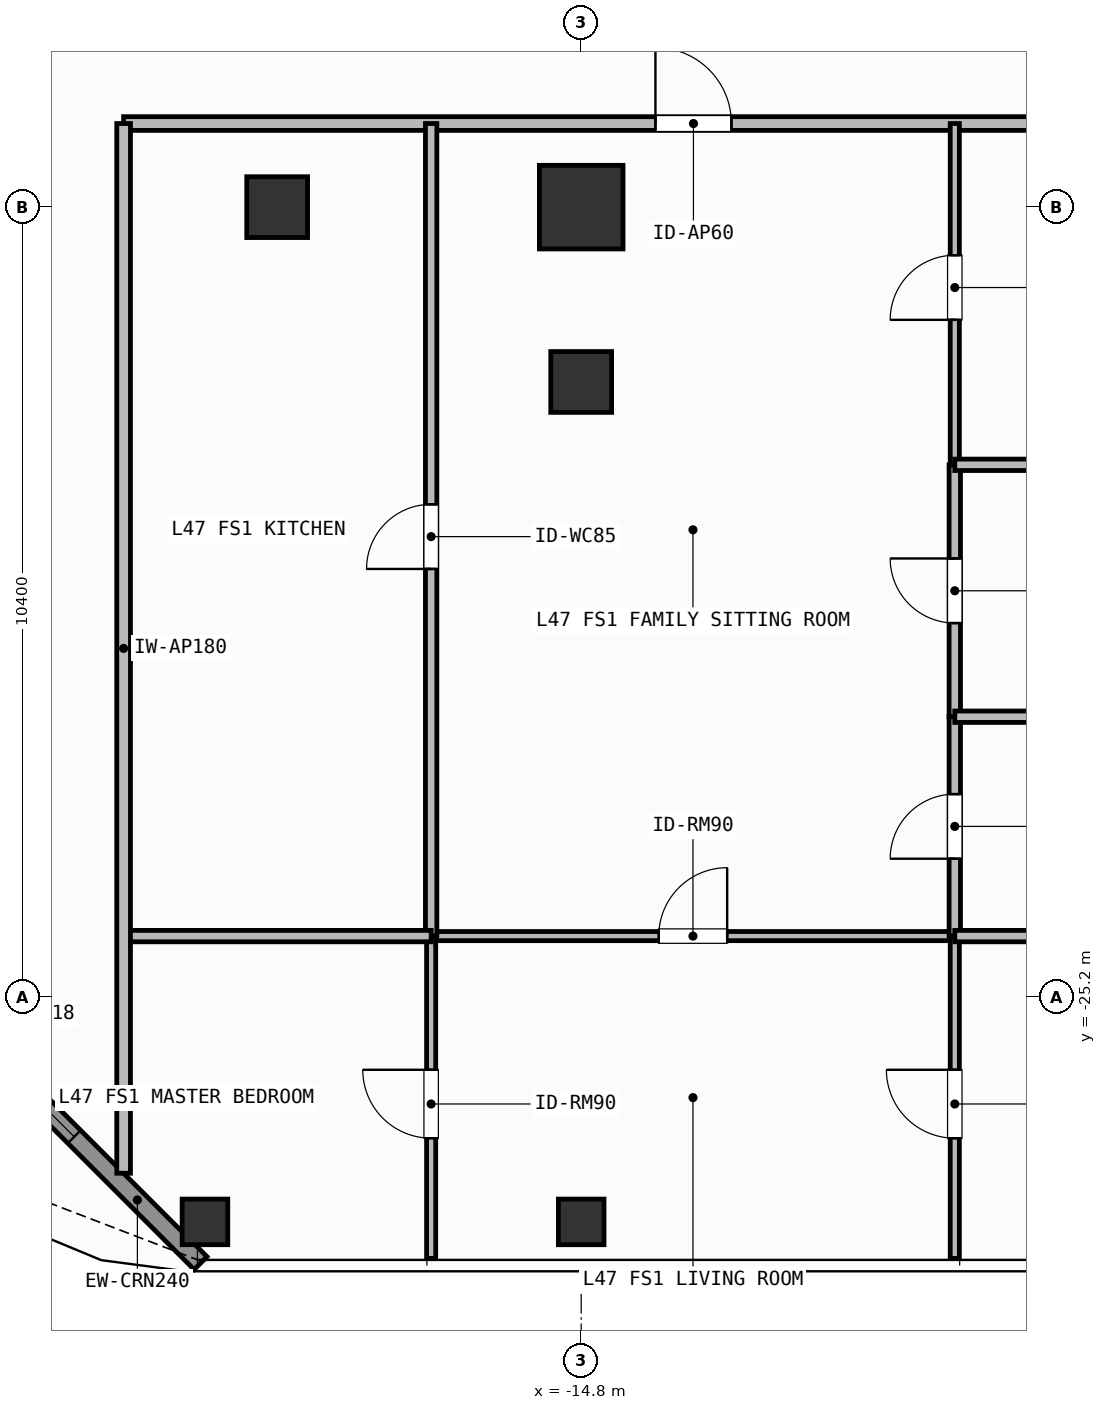
"""IFC4 building model, lengths in metres.
Left out: names, types, materials, properties, quantities, classifications, styles, units other than length and angle.
Written with IfcOpenShell. Run it as: python <this file> out.ifc"""

import sys

from ifc_helpers import new_model, si_unit, direction, frame, frame_2d, origin, origin_2d, place, context, subcontext, project, spatial, rectangle, hollow_rectangle, extrude, element, fill, save


model = new_model("IFC4")
c1 = context("Model", 3, precision=1e-05, world=origin(), true_north=direction((0.0, 1.0)))
c2 = subcontext(c1, "Body", "Model", "MODEL_VIEW")
j1 = project(units=[si_unit("LENGTHUNIT", "METRE"), si_unit("PLANEANGLEUNIT", "RADIAN")], contexts=[c1])
p1 = place(None, origin())
s1 = spatial("IfcSite", under=j1, at=p1, CompositionType="ELEMENT")
p2 = place(p1, origin())
s2 = spatial("IfcBuilding", under=s1, at=p2, CompositionType="ELEMENT")
p3 = place(p2, frame((0.0, 0.0, 191.4)))
s3 = spatial("IfcBuildingStorey", under=s2, at=p3, CompositionType="ELEMENT", Elevation=191.4)
p4 = place(p3, frame((-14.8, -14.8, 0.0), z_axis=(0.0, 0.0, 1.0), x_axis=(1.0, 0.0, 0.0)))
e1 = element("IfcColumn", 1, at=p4, inside=s3, PredefinedType="COLUMN", context=c2, shape_type="SweptSolid", body=[
    extrude(rectangle(XDim=1.1, YDim=1.1, at=origin_2d()), origin(), (0.0, 0.0, 1.0), 3.9),
])
for number, where, z_axis, x_axis in (
    (2, (-18.8, -14.8, 0.0), (0.0, 0.0, 1.0), (1.0, 0.0, 0.0)),
    (3, (-14.8, -17.1, 0.0), (0.0, 0.0, 1.0), (1.0, 0.0, 0.0)),
):
    element("IfcColumn", number, at=place(p3, frame(where, z_axis=z_axis, x_axis=x_axis)), inside=s3, PredefinedType="COLUMN", context=c2, shape_type="SweptSolid", body=[
        extrude(hollow_rectangle(XDim=0.8, YDim=0.8, WallThickness=0.036, at=origin_2d()), origin(), (0.0, 0.0, 1.0), 3.9),
    ])
for number, where, z_axis, x_axis in (
    (4, (-19.75, -28.15, 0.0), (0.0, 0.0, 1.0), (1.0, 0.0, 0.0)),
    (5, (-14.8, -28.15, 0.0), (0.0, 0.0, 1.0), (1.0, 0.0, 0.0)),
):
    element("IfcColumn", number, at=place(p3, frame(where, z_axis=z_axis, x_axis=x_axis)), inside=s3, PredefinedType="COLUMN", context=c2, shape_type="SweptSolid", body=[
        extrude(hollow_rectangle(XDim=0.6, YDim=0.6, WallThickness=0.028, at=origin_2d()), origin(), (0.0, 0.0, 1.0), 3.9),
    ])
p5 = place(p3, frame((-19.808, -28.692, 0.0), z_axis=(0.0, 0.0, 1.0), x_axis=(-0.707106781187, 0.707106781187, 0.0)))
e6 = element("IfcWall", 6, at=p5, inside=s3, PredefinedType="SOLIDWALL", context=c2, shape_type="SweptSolid", body=[
    extrude(rectangle(XDim=6.201, YDim=0.24, at=frame_2d((3.101, 0.0))), origin(), (0.0, 0.0, 1.0), 3.68),
])
p6 = place(p5, frame((2.351, 0.0, 0.8)))
e7 = element("IfcOpeningElement", 7, at=p6, cuts=e6, PredefinedType="OPENING", context=c2, shape_type="SweptSolid", body=[
    extrude(rectangle(XDim=1.5, YDim=1.85, at=frame_2d((0.75, 0.925))), frame((0.0, 0.13, 0.0), z_axis=(0.0, -1.0, 0.0), x_axis=(1.0, 0.0, 0.0)), (0.0, 0.0, 1.0), 0.26),
])
p7 = place(p3, frame((-20.82, -13.7, 0.0), z_axis=(0.0, 0.0, 1.0), x_axis=(1.0, 0.0, 0.0)))
e8 = element("IfcWall", 8, at=p7, inside=s3, PredefinedType="PARTITIONING", context=c2, shape_type="SweptSolid", body=[
    extrude(rectangle(XDim=15.893, YDim=0.18, at=frame_2d((7.947, 0.0))), origin(), (0.0, 0.0, 1.0), 3.68),
])
p8 = place(p7, frame((6.997, 0.0, 0.0)))
e9 = element("IfcOpeningElement", 9, at=p8, cuts=e8, PredefinedType="OPENING", context=c2, shape_type="SweptSolid", body=[
    extrude(rectangle(XDim=1.0, YDim=2.2, at=frame_2d((0.5, 1.1))), frame((0.0, 0.1, 0.0), z_axis=(0.0, -1.0, 0.0), x_axis=(1.0, 0.0, 0.0)), (0.0, 0.0, 1.0), 0.2),
])
p9 = place(p3, frame((-16.774, -24.39, 0.0), z_axis=(0.0, 0.0, 1.0), x_axis=(1.0, 0.0, 0.0)))
e10 = element("IfcWall", 10, at=p9, inside=s3, PredefinedType="PARTITIONING", context=c2, shape_type="SweptSolid", body=[
    extrude(rectangle(XDim=6.889, YDim=0.12, at=frame_2d((3.444, 0.0))), origin(), (0.0, 0.0, 1.0), 3.68),
])
p10 = place(p9, frame((2.994, 0.0, 0.0)))
e11 = element("IfcOpeningElement", 11, at=p10, cuts=e10, PredefinedType="OPENING", context=c2, shape_type="SweptSolid", body=[
    extrude(rectangle(XDim=0.9, YDim=2.1, at=frame_2d((0.45, 1.05))), frame((0.0, 0.07, 0.0), z_axis=(0.0, -1.0, 0.0), x_axis=(1.0, 0.0, 0.0)), (0.0, 0.0, 1.0), 0.14),
])
p11 = place(p3, frame((-16.774, -24.39, 0.0), z_axis=(0.0, 0.0, 1.0), x_axis=(0.0, 1.0, 0.0)))
e12 = element("IfcWall", 12, at=p11, inside=s3, PredefinedType="PARTITIONING", context=c2, shape_type="SweptSolid", body=[
    extrude(rectangle(XDim=10.69, YDim=0.15, at=frame_2d((5.345, 0.0))), origin(), (0.0, 0.0, 1.0), 3.68),
])
p12 = place(p11, frame((4.83, 0.0, 0.0)))
e13 = element("IfcOpeningElement", 13, at=p12, cuts=e12, PredefinedType="OPENING", context=c2, shape_type="SweptSolid", body=[
    extrude(rectangle(XDim=0.85, YDim=2.1, at=frame_2d((0.425, 1.05))), frame((0.0, 0.085, 0.0), z_axis=(0.0, -1.0, 0.0), x_axis=(1.0, 0.0, 0.0)), (0.0, 0.0, 1.0), 0.17),
])
p13 = place(p3, frame((-16.774, -28.63, 0.0), z_axis=(0.0, 0.0, 1.0), x_axis=(0.0, 1.0, 0.0)))
e14 = element("IfcWall", 14, at=p13, inside=s3, PredefinedType="PARTITIONING", context=c2, shape_type="SweptSolid", body=[
    extrude(rectangle(XDim=4.24, YDim=0.12, at=frame_2d((2.12, 0.0))), origin(), (0.0, 0.0, 1.0), 3.68),
])
p14 = place(p13, frame((1.581, 0.0, 0.0)))
e15 = element("IfcOpeningElement", 15, at=p14, cuts=e14, PredefinedType="OPENING", context=c2, shape_type="SweptSolid", body=[
    extrude(rectangle(XDim=0.9, YDim=2.1, at=frame_2d((0.45, 1.05))), frame((0.0, 0.07, 0.0), z_axis=(0.0, -1.0, 0.0), x_axis=(1.0, 0.0, 0.0)), (0.0, 0.0, 1.0), 0.14),
])
p15 = place(p3, frame((-9.885, -24.39, 0.0), z_axis=(0.0, 0.0, 1.0), x_axis=(0.0, 1.0, 0.0)))
e16 = element("IfcWall", 16, at=p15, inside=s3, PredefinedType="PARTITIONING", context=c2, shape_type="SweptSolid", body=[
    extrude(rectangle(XDim=2.886, YDim=0.15, at=frame_2d((1.443, 0.0))), origin(), (0.0, 0.0, 1.0), 3.68),
])
p16 = place(p15, frame((1.018, 0.0, 0.0)))
e17 = element("IfcOpeningElement", 17, at=p16, cuts=e16, PredefinedType="OPENING", context=c2, shape_type="SweptSolid", body=[
    extrude(rectangle(XDim=0.85, YDim=2.1, at=frame_2d((0.425, 1.05))), frame((0.0, 0.085, 0.0), z_axis=(0.0, -1.0, 0.0), x_axis=(1.0, 0.0, 0.0)), (0.0, 0.0, 1.0), 0.17),
])
p17 = place(p3, frame((-9.885, -21.504, 0.0), z_axis=(0.0, 0.0, 1.0), x_axis=(0.0, 1.0, 0.0)))
e18 = element("IfcWall", 18, at=p17, inside=s3, PredefinedType="PARTITIONING", context=c2, shape_type="SweptSolid", body=[
    extrude(rectangle(XDim=3.314, YDim=0.15, at=frame_2d((1.657, 0.0))), origin(), (0.0, 0.0, 1.0), 3.68),
])
p18 = place(p17, frame((1.232, 0.0, 0.0)))
e19 = element("IfcOpeningElement", 19, at=p18, cuts=e18, PredefinedType="OPENING", context=c2, shape_type="SweptSolid", body=[
    extrude(rectangle(XDim=0.85, YDim=2.1, at=frame_2d((0.425, 1.05))), frame((0.0, 0.085, 0.0), z_axis=(0.0, -1.0, 0.0), x_axis=(1.0, 0.0, 0.0)), (0.0, 0.0, 1.0), 0.17),
])
p19 = place(p3, frame((-9.885, -18.19, 0.0), z_axis=(0.0, 0.0, 1.0), x_axis=(0.0, 1.0, 0.0)))
e20 = element("IfcWall", 20, at=p19, inside=s3, PredefinedType="PARTITIONING", context=c2, shape_type="SweptSolid", body=[
    extrude(rectangle(XDim=4.49, YDim=0.12, at=frame_2d((2.245, 0.0))), origin(), (0.0, 0.0, 1.0), 3.68),
])
p20 = place(p19, frame((1.907, 0.0, 0.0)))
e21 = element("IfcOpeningElement", 21, at=p20, cuts=e20, PredefinedType="OPENING", context=c2, shape_type="SweptSolid", body=[
    extrude(rectangle(XDim=0.85, YDim=2.1, at=frame_2d((0.425, 1.05))), frame((0.0, 0.07, 0.0), z_axis=(0.0, -1.0, 0.0), x_axis=(1.0, 0.0, 0.0)), (0.0, 0.0, 1.0), 0.14),
])
p21 = place(p3, frame((-9.885, -28.63, 0.0), z_axis=(0.0, 0.0, 1.0), x_axis=(0.0, 1.0, 0.0)))
e22 = element("IfcWall", 22, at=p21, inside=s3, PredefinedType="PARTITIONING", context=c2, shape_type="SweptSolid", body=[
    extrude(rectangle(XDim=4.24, YDim=0.12, at=frame_2d((2.12, 0.0))), origin(), (0.0, 0.0, 1.0), 3.68),
])
p22 = place(p21, frame((1.581, 0.0, 0.0)))
e23 = element("IfcOpeningElement", 23, at=p22, cuts=e22, PredefinedType="OPENING", context=c2, shape_type="SweptSolid", body=[
    extrude(rectangle(XDim=0.9, YDim=2.1, at=frame_2d((0.45, 1.05))), frame((0.0, 0.07, 0.0), z_axis=(0.0, -1.0, 0.0), x_axis=(1.0, 0.0, 0.0)), (0.0, 0.0, 1.0), 0.14),
])
p23 = place(p3, frame((-20.82, -24.39, 0.0), z_axis=(0.0, 0.0, 1.0), x_axis=(1.0, 0.0, 0.0)))
e24 = element("IfcWall", 24, at=p23, inside=s3, PredefinedType="PARTITIONING", context=c2, shape_type="SweptSolid", body=[
    extrude(rectangle(XDim=4.046, YDim=0.15, at=frame_2d((2.023, 0.0))), origin(), (0.0, 0.0, 1.0), 3.68),
])
for number, where, z_axis, x_axis in (
    (25, (-9.885, -21.504, 0.0), (0.0, 0.0, 1.0), (1.0, 0.0, 0.0)),
    (26, (-9.885, -18.19, 0.0), (0.0, 0.0, 1.0), (1.0, 0.0, 0.0)),
    (27, (-9.885, -24.39, 0.0), (0.0, 0.0, 1.0), (1.0, 0.0, 0.0)),
):
    element("IfcWall", number, at=place(p3, frame(where, z_axis=z_axis, x_axis=x_axis)), inside=s3, PredefinedType="PARTITIONING", context=c2, shape_type="SweptSolid", body=[
        extrude(rectangle(XDim=4.958, YDim=0.15, at=frame_2d((2.479, 0.0))), origin(), (0.0, 0.0, 1.0), 3.68),
    ])
p24 = place(p3, frame((-20.82, -27.51, 0.0), z_axis=(0.0, 0.0, 1.0), x_axis=(0.0, 1.0, 0.0)))
e28 = element("IfcWall", 28, at=p24, inside=s3, PredefinedType="PARTITIONING", context=c2, shape_type="SweptSolid", body=[
    extrude(rectangle(XDim=13.81, YDim=0.18, at=frame_2d((6.905, 0.0))), origin(), (0.0, 0.0, 1.0), 3.68),
])
p25 = place(p6, origin())
e29 = element("IfcWindow", 29, at=p25, inside=s3, PartitioningType="SINGLE_PANEL", PredefinedType="WINDOW", context=c2, shape_type="SweptSolid", body=[
    extrude(rectangle(XDim=1.5, YDim=1.85, at=frame_2d((0.75, 0.925))), frame((0.0, 0.03, 0.0), z_axis=(0.0, -1.0, 0.0), x_axis=(1.0, 0.0, 0.0)), (0.0, 0.0, 1.0), 0.06),
])
fill(e7, e29)
p26 = place(p8, origin())
e30 = element("IfcDoor", 30, at=p26, inside=s3, OperationType="SINGLE_SWING_LEFT", PredefinedType="DOOR", context=c2, shape_type="SweptSolid", body=[
    extrude(rectangle(XDim=1.0, YDim=2.2, at=frame_2d((0.5, 1.1))), frame((0.0, 0.025, 0.0), z_axis=(0.0, -1.0, 0.0), x_axis=(1.0, 0.0, 0.0)), (0.0, 0.0, 1.0), 0.05),
])
fill(e9, e30)
p27 = place(p10, origin())
e31 = element("IfcDoor", 31, at=p27, inside=s3, OperationType="SINGLE_SWING_RIGHT", PredefinedType="DOOR", context=c2, shape_type="SweptSolid", body=[
    extrude(rectangle(XDim=0.9, YDim=2.1, at=frame_2d((0.45, 1.05))), frame((0.0, 0.025, 0.0), z_axis=(0.0, -1.0, 0.0), x_axis=(1.0, 0.0, 0.0)), (0.0, 0.0, 1.0), 0.05),
])
fill(e11, e31)
p28 = place(p12, origin())
e32 = element("IfcDoor", 32, at=p28, inside=s3, OperationType="SINGLE_SWING_LEFT", PredefinedType="DOOR", context=c2, shape_type="SweptSolid", body=[
    extrude(rectangle(XDim=0.85, YDim=2.1, at=frame_2d((0.425, 1.05))), frame((0.0, 0.025, 0.0), z_axis=(0.0, -1.0, 0.0), x_axis=(1.0, 0.0, 0.0)), (0.0, 0.0, 1.0), 0.05),
])
fill(e13, e32)
p29 = place(p14, origin())
e33 = element("IfcDoor", 33, at=p29, inside=s3, OperationType="SINGLE_SWING_RIGHT", PredefinedType="DOOR", context=c2, shape_type="SweptSolid", body=[
    extrude(rectangle(XDim=0.9, YDim=2.1, at=frame_2d((0.45, 1.05))), frame((0.0, 0.025, 0.0), z_axis=(0.0, -1.0, 0.0), x_axis=(1.0, 0.0, 0.0)), (0.0, 0.0, 1.0), 0.05),
])
fill(e15, e33)
p30 = place(p16, origin())
e34 = element("IfcDoor", 34, at=p30, inside=s3, OperationType="SINGLE_SWING_LEFT", PredefinedType="DOOR", context=c2, shape_type="SweptSolid", body=[
    extrude(rectangle(XDim=0.85, YDim=2.1, at=frame_2d((0.425, 1.05))), frame((0.0, 0.025, 0.0), z_axis=(0.0, -1.0, 0.0), x_axis=(1.0, 0.0, 0.0)), (0.0, 0.0, 1.0), 0.05),
])
fill(e17, e34)
p31 = place(p18, origin())
e35 = element("IfcDoor", 35, at=p31, inside=s3, OperationType="SINGLE_SWING_RIGHT", PredefinedType="DOOR", context=c2, shape_type="SweptSolid", body=[
    extrude(rectangle(XDim=0.85, YDim=2.1, at=frame_2d((0.425, 1.05))), frame((0.0, 0.025, 0.0), z_axis=(0.0, -1.0, 0.0), x_axis=(1.0, 0.0, 0.0)), (0.0, 0.0, 1.0), 0.05),
])
fill(e19, e35)
p32 = place(p20, origin())
e36 = element("IfcDoor", 36, at=p32, inside=s3, OperationType="SINGLE_SWING_LEFT", PredefinedType="DOOR", context=c2, shape_type="SweptSolid", body=[
    extrude(rectangle(XDim=0.85, YDim=2.1, at=frame_2d((0.425, 1.05))), frame((0.0, 0.025, 0.0), z_axis=(0.0, -1.0, 0.0), x_axis=(1.0, 0.0, 0.0)), (0.0, 0.0, 1.0), 0.05),
])
fill(e21, e36)
p33 = place(p22, origin())
e37 = element("IfcDoor", 37, at=p33, inside=s3, OperationType="SINGLE_SWING_RIGHT", PredefinedType="DOOR", context=c2, shape_type="SweptSolid", body=[
    extrude(rectangle(XDim=0.9, YDim=2.1, at=frame_2d((0.45, 1.05))), frame((0.0, 0.025, 0.0), z_axis=(0.0, -1.0, 0.0), x_axis=(1.0, 0.0, 0.0)), (0.0, 0.0, 1.0), 0.05),
])
fill(e23, e37)
save(model, sys.argv[1])
